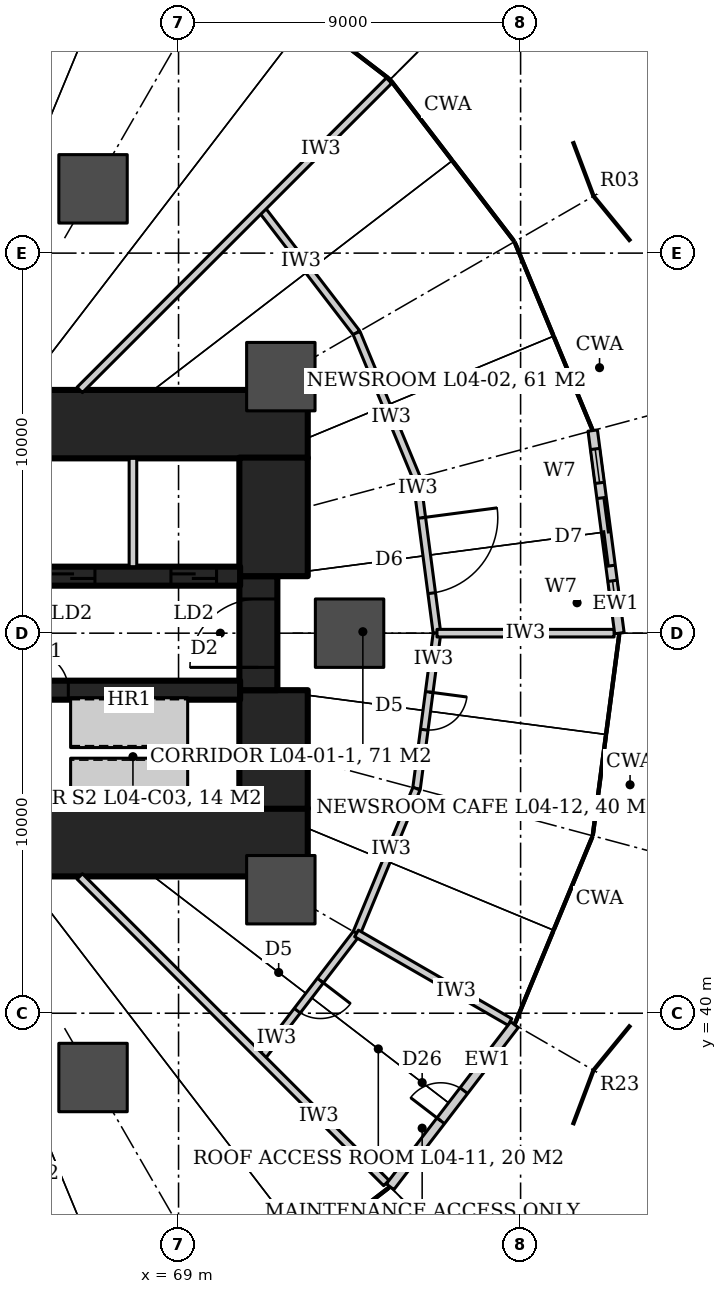
"""IFC4 building model, lengths in metres.
Left out: names, types, materials, properties, quantities, classifications, styles, units other than length and angle.
Written with IfcOpenShell. Run it as: python <this file> out.ifc"""

import sys

from ifc_helpers import new_model, si_unit, direction, frame, frame_2d, origin, origin_2d, place, context, subcontext, project, spatial, rectangle, hollow_circle, extrude, element, fill, save


model = new_model("IFC4")
c1 = context("Model", 3, precision=1e-05, world=origin(), true_north=direction((0.0, 1.0)))
c2 = subcontext(c1, "Body", "Model", "MODEL_VIEW")
j1 = project(units=[si_unit("LENGTHUNIT", "METRE"), si_unit("PLANEANGLEUNIT", "RADIAN")], contexts=[c1])
p1 = place(None, origin())
s1 = spatial("IfcSite", under=j1, at=p1, CompositionType="ELEMENT")
p2 = place(p1, origin())
s2 = spatial("IfcBuilding", under=s1, at=p2, CompositionType="ELEMENT")
p3 = place(p2, frame((0.0, 0.0, 26.0)))
s3 = spatial("IfcBuildingStorey", under=s2, at=p3, CompositionType="ELEMENT", Elevation=26.0)
for number, where, z_axis, x_axis in (
    (1, (64.6, 55.5, 0.0), (0.0, 0.0, 1.0), (1.0, 0.0, 0.0)),
    (2, (64.6, 44.5, 0.0), (0.0, 0.0, 1.0), (1.0, 0.0, 0.0)),
):
    element("IfcWall", number, at=place(p3, frame(where, z_axis=z_axis, x_axis=x_axis)), inside=s3, PredefinedType="SHEAR", context=c2, shape_type="SweptSolid", body=[
        extrude(rectangle(XDim=7.8, YDim=1.8, at=frame_2d((3.9, 0.0))), origin(), (0.0, 0.0, 1.0), 4.2),
    ])
p4 = place(p3, frame((71.5, 45.38, 0.0), z_axis=(0.0, 0.0, 1.0), x_axis=(0.0, 1.0, 0.0)))
e3 = element("IfcWall", 3, at=p4, inside=s3, PredefinedType="SHEAR", context=c2, shape_type="SweptSolid", body=[
    extrude(rectangle(XDim=3.12, YDim=1.8, at=frame_2d((1.56, 0.0))), origin(), (0.0, 0.0, 1.0), 4.2),
])
p5 = place(p3, frame((71.1, 48.5, 0.0), z_axis=(0.0, 0.0, 1.0), x_axis=(0.0, 1.0, 0.0)))
e4 = element("IfcWall", 4, at=p5, inside=s3, PredefinedType="SHEAR", context=c2, shape_type="SweptSolid", body=[
    extrude(rectangle(XDim=3.0, YDim=1.0, at=frame_2d((1.5, 0.0))), origin(), (0.0, 0.0, 1.0), 4.2),
])
p6 = place(p5, frame((0.6, 0.0, 0.0)))
e5 = element("IfcOpeningElement", 5, at=p6, cuts=e4, PredefinedType="OPENING", context=c2, shape_type="SweptSolid", body=[
    extrude(rectangle(XDim=1.8, YDim=2.1, at=frame_2d((0.9, 1.05))), frame((0.0, 0.51, 0.0), z_axis=(0.0, -1.0, 0.0), x_axis=(1.0, 0.0, 0.0)), (0.0, 0.0, 1.0), 1.02),
])
p7 = place(p3, frame((71.5, 51.5, 0.0), z_axis=(0.0, 0.0, 1.0), x_axis=(0.0, 1.0, 0.0)))
e6 = element("IfcWall", 6, at=p7, inside=s3, PredefinedType="SHEAR", context=c2, shape_type="SweptSolid", body=[
    extrude(rectangle(XDim=3.12, YDim=1.8, at=frame_2d((1.56, 0.0))), origin(), (0.0, 0.0, 1.0), 4.2),
])
p8 = place(p3, frame((64.6, 51.5, 0.0), z_axis=(0.0, 0.0, 1.0), x_axis=(1.0, 0.0, 0.0)))
e7 = element("IfcWall", 7, at=p8, inside=s3, PredefinedType="SHEAR", context=c2, shape_type="SweptSolid", body=[
    extrude(rectangle(XDim=6.02, YDim=0.5, at=frame_2d((3.01, 0.0))), origin(), (0.0, 0.0, 1.0), 4.2),
])
p9 = place(p8, frame((1.0, 0.0, 0.0)))
e8 = element("IfcOpeningElement", 8, at=p9, cuts=e7, PredefinedType="OPENING", context=c2, shape_type="SweptSolid", body=[
    extrude(rectangle(XDim=1.2, YDim=2.1, at=frame_2d((0.6, 1.05))), frame((0.0, 0.26, 0.0), z_axis=(0.0, -1.0, 0.0), x_axis=(1.0, 0.0, 0.0)), (0.0, 0.0, 1.0), 0.52),
])
p10 = place(p8, frame((4.2, 0.0, 0.0)))
e9 = element("IfcOpeningElement", 9, at=p10, cuts=e7, PredefinedType="OPENING", context=c2, shape_type="SweptSolid", body=[
    extrude(rectangle(XDim=1.2, YDim=2.1, at=frame_2d((0.6, 1.05))), frame((0.0, 0.26, 0.0), z_axis=(0.0, -1.0, 0.0), x_axis=(1.0, 0.0, 0.0)), (0.0, 0.0, 1.0), 0.52),
])
p11 = place(p3, frame((64.6, 48.5, 0.0), z_axis=(0.0, 0.0, 1.0), x_axis=(1.0, 0.0, 0.0)))
e10 = element("IfcWall", 10, at=p11, inside=s3, PredefinedType="SHEAR", context=c2, shape_type="SweptSolid", body=[
    extrude(rectangle(XDim=6.02, YDim=0.5, at=frame_2d((3.01, 0.0))), origin(), (0.0, 0.0, 1.0), 4.2),
])
p12 = place(p11, frame((0.5, 0.0, 0.0)))
e11 = element("IfcOpeningElement", 11, at=p12, cuts=e10, PredefinedType="OPENING", context=c2, shape_type="SweptSolid", body=[
    extrude(rectangle(XDim=1.0, YDim=2.1, at=frame_2d((0.5, 1.05))), frame((0.0, 0.26, 0.0), z_axis=(0.0, -1.0, 0.0), x_axis=(1.0, 0.0, 0.0)), (0.0, 0.0, 1.0), 0.52),
])
for number, where, z_axis, x_axis in (
    (12, (73.5, 50.0, -0.16), (0.0, 0.0, 1.0), (1.0, 0.0, 0.0)),
    (13, (71.691, 56.75, -0.16), (0.0, 0.0, 1.0), (1.0, 0.0, 0.0)),
    (14, (66.75, 61.691, -0.16), (0.0, 0.0, 1.0), (1.0, 0.0, 0.0)),
    (15, (66.75, 38.309, -0.16), (0.0, 0.0, 1.0), (1.0, 0.0, 0.0)),
    (16, (71.691, 43.25, -0.16), (0.0, 0.0, 1.0), (1.0, 0.0, 0.0)),
):
    element("IfcColumn", number, at=place(p3, frame(where, z_axis=z_axis, x_axis=x_axis)), inside=s3, PredefinedType="COLUMN", context=c2, shape_type="SweptSolid", body=[
        extrude(hollow_circle(Radius=0.9, WallThickness=0.09, at=origin_2d()), origin(), (0.0, 0.0, 1.0), 4.36),
    ])
p13 = place(p3, frame((71.172, 61.172, 0.0), z_axis=(0.0, 0.0, 1.0), x_axis=(0.608714823874, -0.793389099494, 0.0)))
e17 = element("IfcWall", 17, at=p13, inside=s3, PredefinedType="PARTITIONING", context=c2, shape_type="SweptSolid", body=[
    extrude(rectangle(XDim=4.125, YDim=0.2, at=frame_2d((2.062, 0.0))), origin(), (0.0, 0.0, 1.0), 3.04),
])
p14 = place(p3, frame((73.683, 57.9, 0.0), z_axis=(0.0, 0.0, 1.0), x_axis=(0.382731667114, -0.923859551549, 0.0)))
e18 = element("IfcWall", 18, at=p14, inside=s3, PredefinedType="PARTITIONING", context=c2, shape_type="SweptSolid", body=[
    extrude(rectangle(XDim=4.125, YDim=0.2, at=frame_2d((2.062, 0.0))), origin(), (0.0, 0.0, 1.0), 3.04),
])
p15 = place(p3, frame((75.262, 54.089, 0.0), z_axis=(0.0, 0.0, 1.0), x_axis=(0.130515758099, -0.991446234996, 0.0)))
e19 = element("IfcWall", 19, at=p15, inside=s3, PredefinedType="PARTITIONING", context=c2, shape_type="SweptSolid", body=[
    extrude(rectangle(XDim=4.125, YDim=0.2, at=frame_2d((2.062, 0.0))), origin(), (0.0, 0.0, 1.0), 3.04),
])
p16 = place(p15, frame((1.062, 0.0, 0.0)))
e20 = element("IfcOpeningElement", 20, at=p16, cuts=e19, PredefinedType="OPENING", context=c2, shape_type="SweptSolid", body=[
    extrude(rectangle(XDim=2.0, YDim=2.1, at=frame_2d((1.0, 1.05))), frame((0.0, 0.11, 0.0), z_axis=(0.0, -1.0, 0.0), x_axis=(1.0, 0.0, 0.0)), (0.0, 0.0, 1.0), 0.22),
])
p17 = place(p3, frame((75.8, 50.0, 0.0), z_axis=(0.0, 0.0, 1.0), x_axis=(-0.130515758099, -0.991446234996, 0.0)))
e21 = element("IfcWall", 21, at=p17, inside=s3, PredefinedType="PARTITIONING", context=c2, shape_type="SweptSolid", body=[
    extrude(rectangle(XDim=4.125, YDim=0.2, at=frame_2d((2.062, 0.0))), origin(), (0.0, 0.0, 1.0), 3.04),
])
p18 = place(p17, frame((1.562, 0.0, 0.0)))
e22 = element("IfcOpeningElement", 22, at=p18, cuts=e21, PredefinedType="OPENING", context=c2, shape_type="SweptSolid", body=[
    extrude(rectangle(XDim=1.0, YDim=2.1, at=frame_2d((0.5, 1.05))), frame((0.0, 0.11, 0.0), z_axis=(0.0, -1.0, 0.0), x_axis=(1.0, 0.0, 0.0)), (0.0, 0.0, 1.0), 0.22),
])
p19 = place(p3, frame((75.262, 45.911, 0.0), z_axis=(0.0, 0.0, 1.0), x_axis=(-0.382731667114, -0.923859551549, 0.0)))
e23 = element("IfcWall", 23, at=p19, inside=s3, PredefinedType="PARTITIONING", context=c2, shape_type="SweptSolid", body=[
    extrude(rectangle(XDim=4.125, YDim=0.2, at=frame_2d((2.062, 0.0))), origin(), (0.0, 0.0, 1.0), 3.04),
])
p20 = place(p3, frame((73.683, 42.1, 0.0), z_axis=(0.0, 0.0, 1.0), x_axis=(-0.608714823874, -0.793389099494, 0.0)))
e24 = element("IfcWall", 24, at=p20, inside=s3, PredefinedType="PARTITIONING", context=c2, shape_type="SweptSolid", body=[
    extrude(rectangle(XDim=4.125, YDim=0.2, at=frame_2d((2.062, 0.0))), origin(), (0.0, 0.0, 1.0), 3.04),
])
p21 = place(p20, frame((1.562, 0.0, 0.0)))
e25 = element("IfcOpeningElement", 25, at=p21, cuts=e24, PredefinedType="OPENING", context=c2, shape_type="SweptSolid", body=[
    extrude(rectangle(XDim=1.0, YDim=2.1, at=frame_2d((0.5, 1.05))), frame((0.0, 0.11, 0.0), z_axis=(0.0, -1.0, 0.0), x_axis=(1.0, 0.0, 0.0)), (0.0, 0.0, 1.0), 0.22),
])
p22 = place(p3, frame((75.8, 50.0, 0.0), z_axis=(0.0, 0.0, 1.0), x_axis=(1.0, 0.0, 0.0)))
e26 = element("IfcWall", 26, at=p22, inside=s3, PredefinedType="PARTITIONING", context=c2, shape_type="SweptSolid", body=[
    extrude(rectangle(XDim=4.66, YDim=0.2, at=frame_2d((2.33, 0.0))), origin(), (0.0, 0.0, 1.0), 3.04),
])
p23 = place(p3, frame((66.4, 56.4, 0.0), z_axis=(0.0, 0.0, 1.0), x_axis=(0.707106781187, 0.707106781187, 0.0)))
e27 = element("IfcWall", 27, at=p23, inside=s3, PredefinedType="PARTITIONING", context=c2, shape_type="SweptSolid", body=[
    extrude(rectangle(XDim=11.509, YDim=0.2, at=frame_2d((5.754, 0.0))), origin(), (0.0, 0.0, 1.0), 3.02),
])
p24 = place(p3, frame((66.4, 43.6, 0.0), z_axis=(0.0, 0.0, 1.0), x_axis=(0.707106781187, -0.707106781187, 0.0)))
e28 = element("IfcWall", 28, at=p24, inside=s3, PredefinedType="PARTITIONING", context=c2, shape_type="SweptSolid", body=[
    extrude(rectangle(XDim=11.409, YDim=0.2, at=frame_2d((5.705, 0.0))), origin(), (0.0, 0.0, 1.0), 3.02),
])
p25 = place(p3, frame((73.683, 42.1, 0.0), z_axis=(0.0, 0.0, 1.0), x_axis=(0.866029425763, -0.499993033663, 0.0)))
e29 = element("IfcWall", 29, at=p25, inside=s3, PredefinedType="PARTITIONING", context=c2, shape_type="SweptSolid", body=[
    extrude(rectangle(XDim=4.66, YDim=0.2, at=frame_2d((2.33, 0.0))), origin(), (0.0, 0.0, 1.0), 3.04),
])
p26 = place(p3, frame((80.6, 50.0, 0.0), z_axis=(0.0, 0.0, 1.0), x_axis=(-0.130519101615, 0.991445794844, 0.0)))
e30 = element("IfcWall", 30, at=p26, inside=s3, PredefinedType="SOLIDWALL", context=c2, shape_type="SweptSolid", body=[
    extrude(rectangle(XDim=5.378, YDim=0.25, at=frame_2d((2.689, 0.0))), origin(), (0.0, 0.0, 1.0), 4.04),
])
p27 = place(p26, frame((1.789, 0.0, 0.0)))
e31 = element("IfcOpeningElement", 31, at=p27, cuts=e30, PredefinedType="OPENING", context=c2, shape_type="SweptSolid", body=[
    extrude(rectangle(XDim=1.8, YDim=2.4, at=frame_2d((0.9, 1.2))), frame((0.0, 0.135, 0.0), z_axis=(0.0, -1.0, 0.0), x_axis=(1.0, 0.0, 0.0)), (0.0, 0.0, 1.0), 0.27),
])
p28 = place(p26, frame((0.489, 0.0, 0.0)))
e32 = element("IfcOpeningElement", 32, at=p28, cuts=e30, PredefinedType="OPENING", context=c2, shape_type="SweptSolid", body=[
    extrude(rectangle(XDim=0.9, YDim=2.4, at=frame_2d((0.45, 1.2))), frame((0.0, 0.135, 0.0), z_axis=(0.0, -1.0, 0.0), x_axis=(1.0, 0.0, 0.0)), (0.0, 0.0, 1.0), 0.27),
])
p29 = place(p26, frame((3.989, 0.0, 0.0)))
e33 = element("IfcOpeningElement", 33, at=p29, cuts=e30, PredefinedType="OPENING", context=c2, shape_type="SweptSolid", body=[
    extrude(rectangle(XDim=0.9, YDim=2.4, at=frame_2d((0.45, 1.2))), frame((0.0, 0.135, 0.0), z_axis=(0.0, -1.0, 0.0), x_axis=(1.0, 0.0, 0.0)), (0.0, 0.0, 1.0), 0.27),
])
p30 = place(p3, frame((74.566, 35.434, 0.0), z_axis=(0.0, 0.0, 1.0), x_axis=(0.608760311307, 0.793354197933, 0.0)))
e34 = element("IfcWall", 34, at=p30, inside=s3, PredefinedType="SOLIDWALL", context=c2, shape_type="SweptSolid", body=[
    extrude(rectangle(XDim=5.378, YDim=0.25, at=frame_2d((2.689, 0.0))), origin(), (0.0, 0.0, 1.0), 4.04),
])
p31 = place(p30, frame((2.189, 0.0, 0.0)))
e35 = element("IfcOpeningElement", 35, at=p31, cuts=e34, PredefinedType="OPENING", context=c2, shape_type="SweptSolid", body=[
    extrude(rectangle(XDim=1.0, YDim=2.1, at=frame_2d((0.5, 1.05))), frame((0.0, 0.135, 0.0), z_axis=(0.0, -1.0, 0.0), x_axis=(1.0, 0.0, 0.0)), (0.0, 0.0, 1.0), 0.27),
])
p32 = place(p3, frame((67.8, 51.75, 0.0), z_axis=(0.0, 0.0, 1.0), x_axis=(0.0, 1.0, 0.0)))
e36 = element("IfcWall", 36, at=p32, inside=s3, PredefinedType="PARTITIONING", context=c2, shape_type="SweptSolid", body=[
    extrude(rectangle(XDim=2.85, YDim=0.2, at=frame_2d((1.425, 0.0))), origin(), (0.0, 0.0, 1.0), 4.2),
])
p33 = place(p16, origin())
e37 = element("IfcDoor", 37, at=p33, inside=s3, OperationType="DOUBLE_DOOR_DOUBLE_SWING", PredefinedType="DOOR", context=c2, shape_type="SweptSolid", body=[
    extrude(rectangle(XDim=2.0, YDim=2.1, at=frame_2d((1.0, 1.05))), frame((0.0, 0.025, 0.0), z_axis=(0.0, -1.0, 0.0), x_axis=(1.0, 0.0, 0.0)), (0.0, 0.0, 1.0), 0.05),
])
fill(e20, e37)
p34 = place(p21, origin())
e38 = element("IfcDoor", 38, at=p34, inside=s3, OperationType="SINGLE_SWING_LEFT", PredefinedType="DOOR", context=c2, shape_type="SweptSolid", body=[
    extrude(rectangle(XDim=1.0, YDim=2.1, at=frame_2d((0.5, 1.05))), frame((0.0, 0.025, 0.0), z_axis=(0.0, -1.0, 0.0), x_axis=(1.0, 0.0, 0.0)), (0.0, 0.0, 1.0), 0.05),
])
fill(e25, e38)
p35 = place(p18, origin())
e39 = element("IfcDoor", 39, at=p35, inside=s3, OperationType="SINGLE_SWING_LEFT", PredefinedType="DOOR", context=c2, shape_type="SweptSolid", body=[
    extrude(rectangle(XDim=1.0, YDim=2.1, at=frame_2d((0.5, 1.05))), frame((0.0, 0.025, 0.0), z_axis=(0.0, -1.0, 0.0), x_axis=(1.0, 0.0, 0.0)), (0.0, 0.0, 1.0), 0.05),
])
fill(e22, e39)
p36 = place(p27, origin())
e40 = element("IfcDoor", 40, at=p36, inside=s3, OperationType="DOUBLE_DOOR_SLIDING", PredefinedType="DOOR", context=c2, shape_type="SweptSolid", body=[
    extrude(rectangle(XDim=1.8, YDim=2.4, at=frame_2d((0.9, 1.2))), frame((0.0, 0.025, 0.0), z_axis=(0.0, -1.0, 0.0), x_axis=(1.0, 0.0, 0.0)), (0.0, 0.0, 1.0), 0.05),
])
fill(e31, e40)
p37 = place(p28, origin())
e41 = element("IfcWindow", 41, at=p37, inside=s3, PartitioningType="SINGLE_PANEL", PredefinedType="WINDOW", context=c2, shape_type="SweptSolid", body=[
    extrude(rectangle(XDim=0.9, YDim=2.4, at=frame_2d((0.45, 1.2))), frame((0.0, 0.03, 0.0), z_axis=(0.0, -1.0, 0.0), x_axis=(1.0, 0.0, 0.0)), (0.0, 0.0, 1.0), 0.06),
])
fill(e32, e41)
p38 = place(p29, origin())
e42 = element("IfcWindow", 42, at=p38, inside=s3, PartitioningType="SINGLE_PANEL", PredefinedType="WINDOW", context=c2, shape_type="SweptSolid", body=[
    extrude(rectangle(XDim=0.9, YDim=2.4, at=frame_2d((0.45, 1.2))), frame((0.0, 0.03, 0.0), z_axis=(0.0, -1.0, 0.0), x_axis=(1.0, 0.0, 0.0)), (0.0, 0.0, 1.0), 0.06),
])
fill(e33, e42)
p39 = place(p31, origin())
e43 = element("IfcDoor", 43, at=p39, inside=s3, OperationType="SINGLE_SWING_LEFT", PredefinedType="DOOR", context=c2, shape_type="SweptSolid", body=[
    extrude(rectangle(XDim=1.0, YDim=2.1, at=frame_2d((0.5, 1.05))), frame((0.0, 0.025, 0.0), z_axis=(0.0, -1.0, 0.0), x_axis=(1.0, 0.0, 0.0)), (0.0, 0.0, 1.0), 0.05),
])
fill(e35, e43)
p40 = place(p12, origin())
e44 = element("IfcDoor", 44, at=p40, inside=s3, OperationType="SINGLE_SWING_LEFT", PredefinedType="DOOR", context=c2, shape_type="SweptSolid", body=[
    extrude(rectangle(XDim=1.0, YDim=2.1, at=frame_2d((0.5, 1.05))), frame((0.0, 0.025, 0.0), z_axis=(0.0, -1.0, 0.0), x_axis=(1.0, 0.0, 0.0)), (0.0, 0.0, 1.0), 0.05),
])
fill(e11, e44)
p41 = place(p9, origin())
e45 = element("IfcDoor", 45, at=p41, inside=s3, OperationType="SLIDING_TO_LEFT", PredefinedType="DOOR", context=c2, shape_type="SweptSolid", body=[
    extrude(rectangle(XDim=1.2, YDim=2.1, at=frame_2d((0.6, 1.05))), frame((0.0, 0.025, 0.0), z_axis=(0.0, -1.0, 0.0), x_axis=(1.0, 0.0, 0.0)), (0.0, 0.0, 1.0), 0.05),
])
fill(e8, e45)
p42 = place(p10, origin())
e46 = element("IfcDoor", 46, at=p42, inside=s3, OperationType="SLIDING_TO_LEFT", PredefinedType="DOOR", context=c2, shape_type="SweptSolid", body=[
    extrude(rectangle(XDim=1.2, YDim=2.1, at=frame_2d((0.6, 1.05))), frame((0.0, 0.025, 0.0), z_axis=(0.0, -1.0, 0.0), x_axis=(1.0, 0.0, 0.0)), (0.0, 0.0, 1.0), 0.05),
])
fill(e9, e46)
p43 = place(p6, origin())
e47 = element("IfcDoor", 47, at=p43, inside=s3, OperationType="DOUBLE_DOOR_DOUBLE_SWING", PredefinedType="DOOR", context=c2, shape_type="SweptSolid", body=[
    extrude(rectangle(XDim=1.8, YDim=2.1, at=frame_2d((0.9, 1.05))), frame((0.0, 0.025, 0.0), z_axis=(0.0, -1.0, 0.0), x_axis=(1.0, 0.0, 0.0)), (0.0, 0.0, 1.0), 0.05),
])
fill(e5, e47)
save(model, sys.argv[1])
